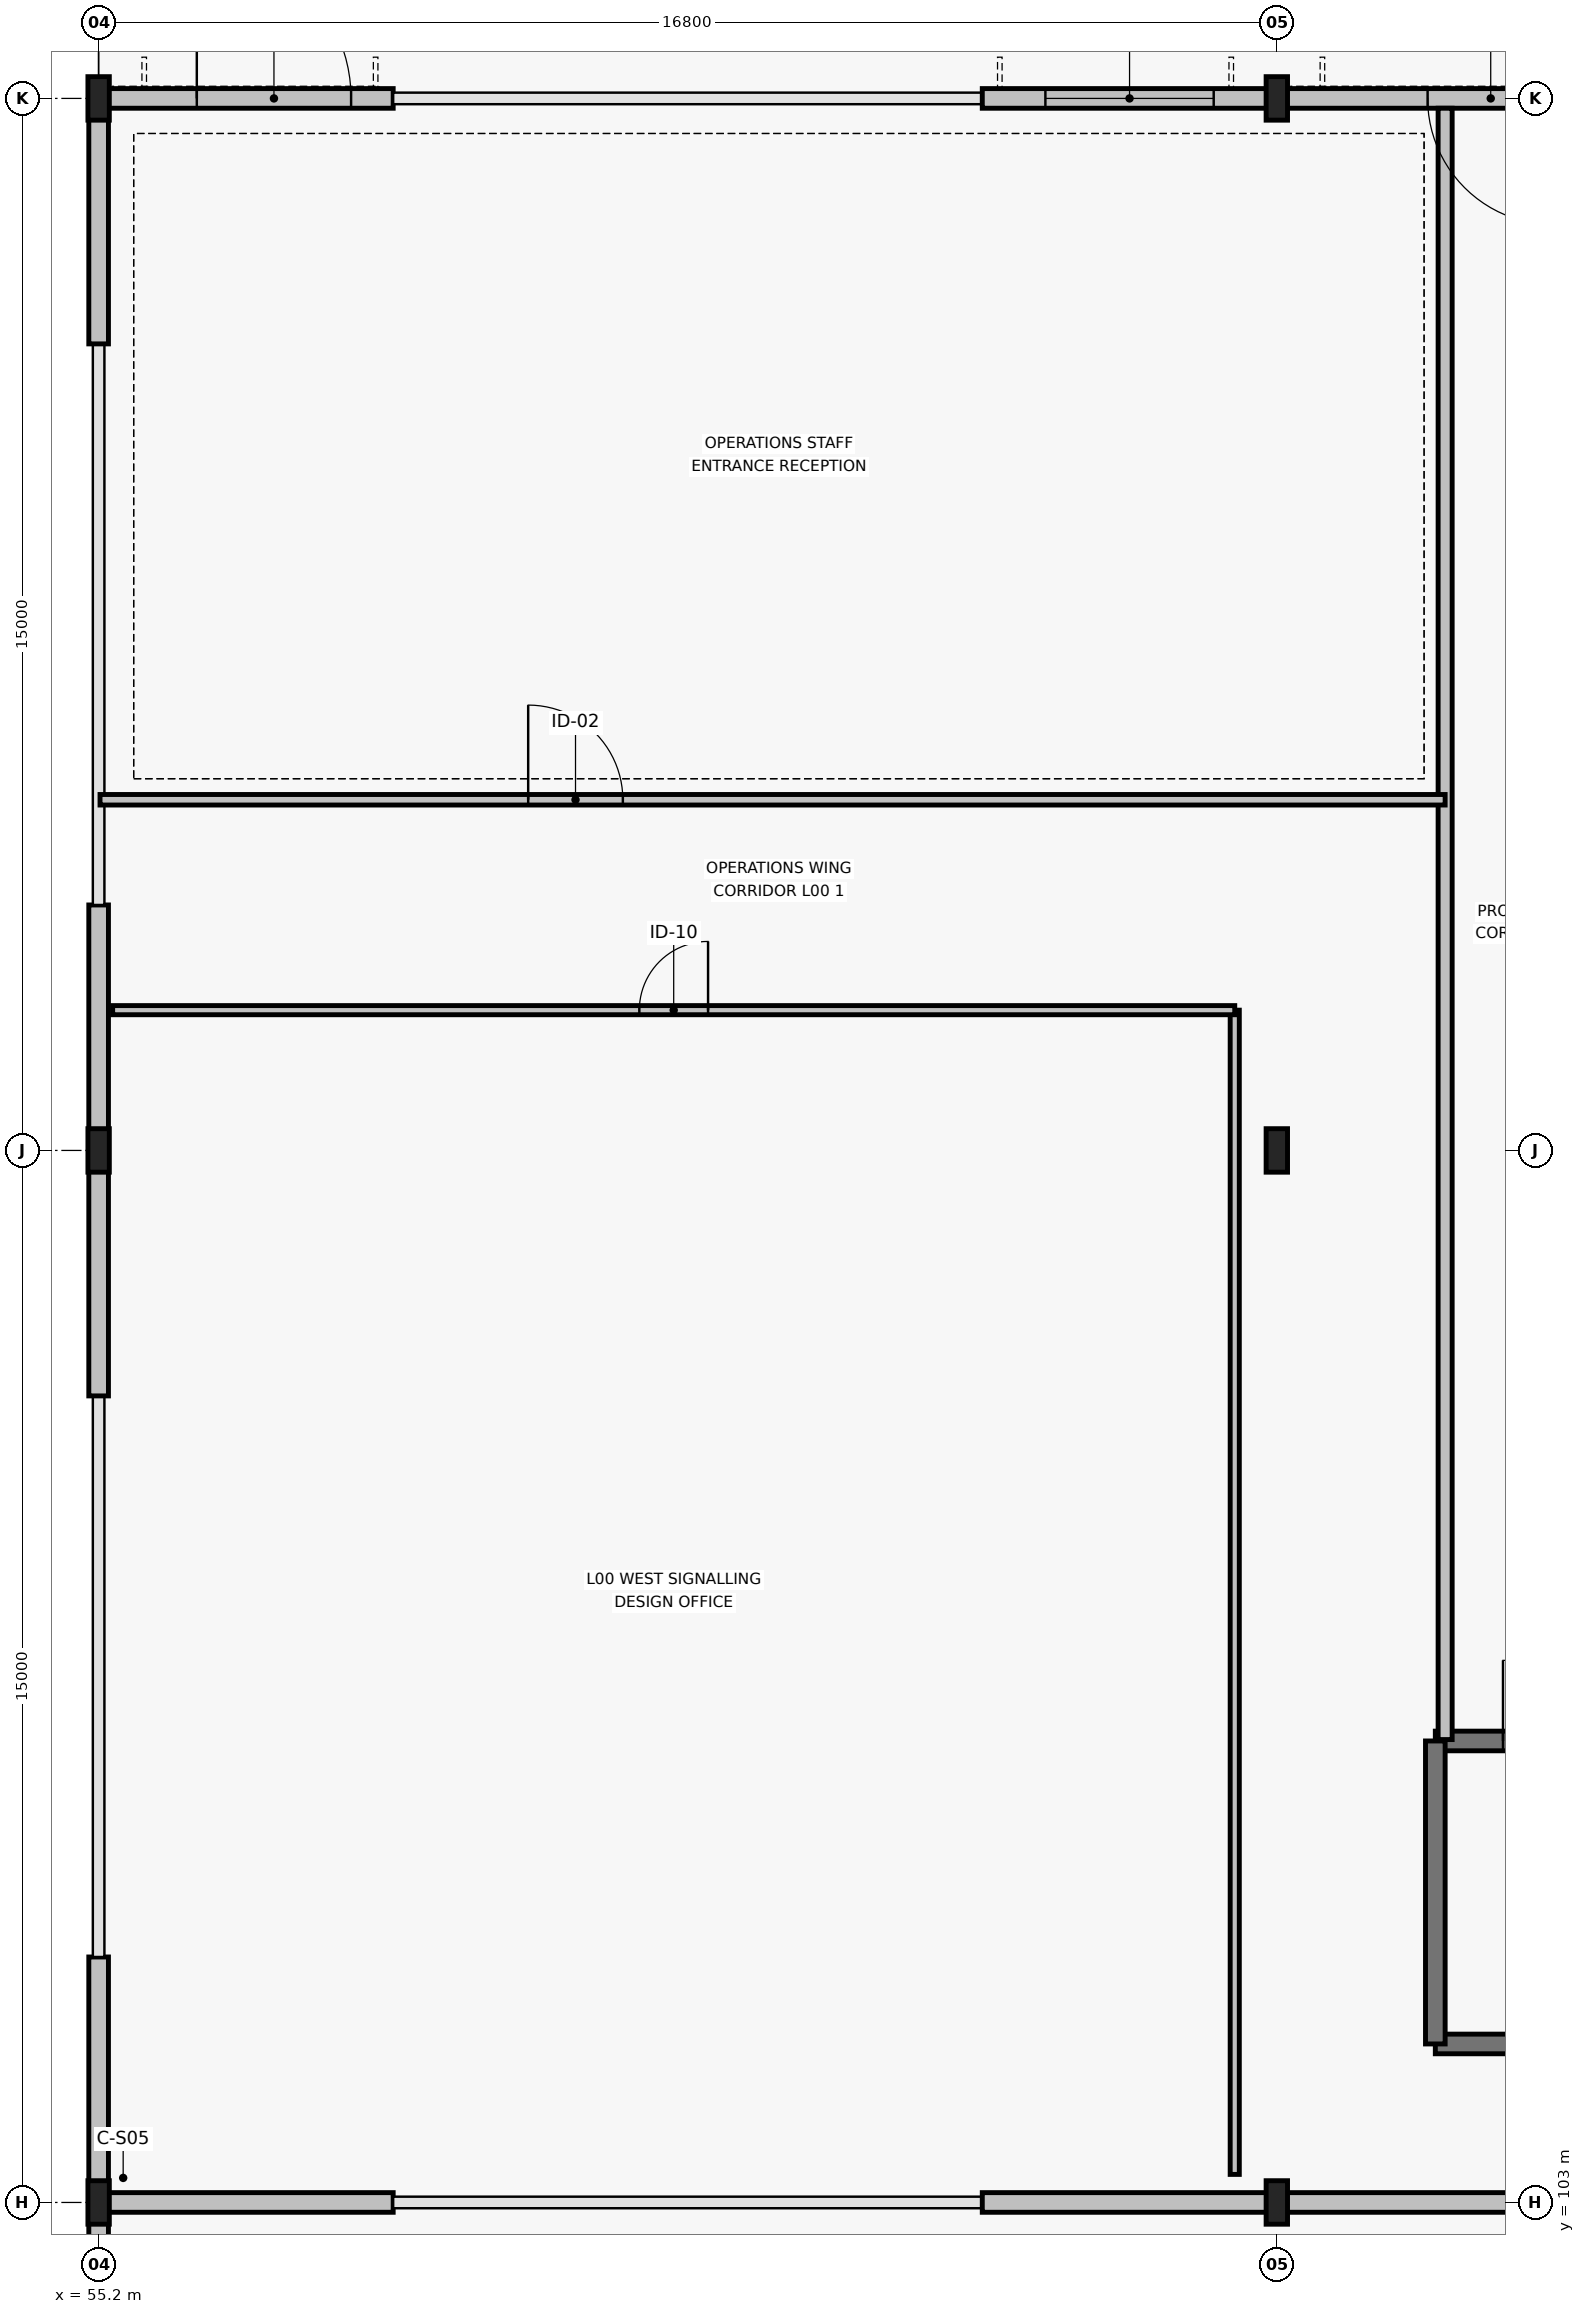
"""IFC4 building model, lengths in metres.
Left out: names, types, materials, properties, quantities, classifications, styles, units other than length and angle.
Written with IfcOpenShell. Run it as: python <this file> out.ifc"""

import sys

from ifc_helpers import new_model, si_unit, direction, frame, frame_2d, origin, origin_2d, place, context, subcontext, project, spatial, rectangle, i_section, extrude, element, fill, save


model = new_model("IFC4")
c1 = context("Model", 3, precision=1e-05, world=origin(), true_north=direction((0.0, 1.0)))
c2 = subcontext(c1, "Body", "Model", "MODEL_VIEW")
j1 = project(units=[si_unit("LENGTHUNIT", "METRE"), si_unit("PLANEANGLEUNIT", "RADIAN")], contexts=[c1])
p1 = place(None, origin())
s1 = spatial("IfcSite", under=j1, at=p1, CompositionType="ELEMENT")
p2 = place(p1, origin())
s2 = spatial("IfcBuilding", under=s1, at=p2, CompositionType="ELEMENT")
p3 = place(p2, origin())
s3 = spatial("IfcBuildingStorey", under=s2, at=p3, CompositionType="ELEMENT", Elevation=0.0)
for number, where, z_axis, x_axis in (
    (1, (55.2, 103.0, 0.0), (0.0, 0.0, 1.0), (1.0, 0.0, 0.0)),
    (2, (55.2, 118.0, 0.0), (0.0, 0.0, 1.0), (1.0, 0.0, 0.0)),
    (3, (55.2, 133.0, 0.0), (0.0, 0.0, 1.0), (1.0, 0.0, 0.0)),
    (4, (72.0, 103.0, 0.0), (0.0, 0.0, 1.0), (1.0, 0.0, 0.0)),
    (5, (72.0, 118.0, 0.0), (0.0, 0.0, 1.0), (1.0, 0.0, 0.0)),
    (6, (72.0, 133.0, 0.0), (0.0, 0.0, 1.0), (1.0, 0.0, 0.0)),
):
    element("IfcColumn", number, at=place(p3, frame(where, z_axis=z_axis, x_axis=x_axis)), inside=s3, PredefinedType="COLUMN", context=c2, shape_type="SweptSolid", body=[
        extrude(i_section(OverallWidth=0.305, OverallDepth=0.62, WebThickness=0.021, FlangeThickness=0.04, FilletRadius=0.027, at=origin_2d()), origin(), (0.0, 0.0, 1.0), 5.4),
    ])
p4 = place(p3, frame((55.2, 133.0, 0.0), z_axis=(0.0, 0.0, 1.0), x_axis=(1.0, 0.0, 0.0)))
e7 = element("IfcWall", 7, at=p4, inside=s3, PredefinedType="STANDARD", context=c2, shape_type="SweptSolid", body=[
    extrude(rectangle(XDim=4.2, YDim=0.28, at=frame_2d((2.1, 0.0))), origin(), (0.0, 0.0, 1.0), 4.765),
])
p5 = place(p4, frame((1.4, 0.0, 0.0)))
e8 = element("IfcOpeningElement", 8, at=p5, cuts=e7, PredefinedType="OPENING", context=c2, shape_type="SweptSolid", body=[
    extrude(rectangle(XDim=2.2, YDim=2.4, at=frame_2d((1.1, 1.2))), frame((0.0, 0.15, 0.0), z_axis=(0.0, -1.0, 0.0), x_axis=(1.0, 0.0, 0.0)), (0.0, 0.0, 1.0), 0.3),
])
p6 = place(p3, frame((67.8, 133.0, 0.0), z_axis=(0.0, 0.0, 1.0), x_axis=(1.0, 0.0, 0.0)))
e9 = element("IfcWall", 9, at=p6, inside=s3, PredefinedType="STANDARD", context=c2, shape_type="SweptSolid", body=[
    extrude(rectangle(XDim=4.2, YDim=0.28, at=frame_2d((2.1, 0.0))), origin(), (0.0, 0.0, 1.0), 4.765),
])
p7 = place(p6, frame((0.9, 0.0, 0.8)))
e10 = element("IfcOpeningElement", 10, at=p7, cuts=e9, PredefinedType="OPENING", context=c2, shape_type="SweptSolid", body=[
    extrude(rectangle(XDim=2.4, YDim=2.05, at=frame_2d((1.2, 1.025))), frame((0.0, 0.15, 0.0), z_axis=(0.0, -1.0, 0.0), x_axis=(1.0, 0.0, 0.0)), (0.0, 0.0, 1.0), 0.3),
])
p8 = place(p3, frame((72.0, 133.0, 0.0), z_axis=(0.0, 0.0, 1.0), x_axis=(1.0, 0.0, 0.0)))
e11 = element("IfcWall", 11, at=p8, inside=s3, PredefinedType="STANDARD", context=c2, shape_type="SweptSolid", body=[
    extrude(rectangle(XDim=4.2, YDim=0.28, at=frame_2d((2.1, 0.0))), origin(), (0.0, 0.0, 1.0), 4.765),
])
p9 = place(p8, frame((2.15, 0.0, 0.0)))
e12 = element("IfcOpeningElement", 12, at=p9, cuts=e11, PredefinedType="OPENING", context=c2, shape_type="SweptSolid", body=[
    extrude(rectangle(XDim=1.8, YDim=2.3, at=frame_2d((0.9, 1.15))), frame((0.0, 0.15, 0.0), z_axis=(0.0, -1.0, 0.0), x_axis=(1.0, 0.0, 0.0)), (0.0, 0.0, 1.0), 0.3),
])
for number, where, z_axis, x_axis in (
    (13, (55.2, 103.0, 0.0), (0.0, 0.0, 1.0), (1.0, 0.0, 0.0)),
    (14, (67.8, 103.0, 0.0), (0.0, 0.0, 1.0), (1.0, 0.0, 0.0)),
    (15, (72.0, 103.0, 0.0), (0.0, 0.0, 1.0), (1.0, 0.0, 0.0)),
):
    element("IfcWall", number, at=place(p3, frame(where, z_axis=z_axis, x_axis=x_axis)), inside=s3, PredefinedType="STANDARD", context=c2, shape_type="SweptSolid", body=[
        extrude(rectangle(XDim=4.2, YDim=0.28, at=frame_2d((2.1, 0.0))), origin(), (0.0, 0.0, 1.0), 4.765),
    ])
p10 = place(p3, frame((55.2, 103.14, 0.0), z_axis=(0.0, 0.0, 1.0), x_axis=(0.0, 1.0, 0.0)))
e16 = element("IfcWall", 16, at=p10, inside=s3, PredefinedType="STANDARD", context=c2, shape_type="SweptSolid", body=[
    extrude(rectangle(XDim=3.36, YDim=0.28, at=frame_2d((1.68, 0.0))), origin(), (0.0, 0.0, 1.0), 4.765),
])
for number, where, z_axis, x_axis in (
    (17, (55.2, 114.5, 0.0), (0.0, 0.0, 1.0), (0.0, 1.0, 0.0)),
    (18, (55.2, 118.0, 0.0), (0.0, 0.0, 1.0), (0.0, 1.0, 0.0)),
):
    element("IfcWall", number, at=place(p3, frame(where, z_axis=z_axis, x_axis=x_axis)), inside=s3, PredefinedType="STANDARD", context=c2, shape_type="SweptSolid", body=[
        extrude(rectangle(XDim=3.5, YDim=0.28, at=frame_2d((1.75, 0.0))), origin(), (0.0, 0.0, 1.0), 4.765),
    ])
p11 = place(p3, frame((55.2, 129.5, 0.0), z_axis=(0.0, 0.0, 1.0), x_axis=(0.0, 1.0, 0.0)))
e19 = element("IfcWall", 19, at=p11, inside=s3, PredefinedType="STANDARD", context=c2, shape_type="SweptSolid", body=[
    extrude(rectangle(XDim=3.36, YDim=0.28, at=frame_2d((1.68, 0.0))), origin(), (0.0, 0.0, 1.0), 4.765),
])
p12 = place(p3, frame((55.2, 96.8, 0.0), z_axis=(0.0, 0.0, 1.0), x_axis=(0.0, 1.0, 0.0)))
e20 = element("IfcWall", 20, at=p12, inside=s3, PredefinedType="STANDARD", context=c2, shape_type="SweptSolid", body=[
    extrude(rectangle(XDim=6.06, YDim=0.28, at=frame_2d((3.03, 0.0))), origin(), (0.0, 0.0, 1.0), 4.625),
])
p13 = place(p12, frame((1.6, 0.0, 0.0)))
e21 = element("IfcOpeningElement", 21, at=p13, cuts=e20, PredefinedType="OPENING", context=c2, shape_type="SweptSolid", body=[
    extrude(rectangle(XDim=2.4, YDim=2.4, at=frame_2d((1.2, 1.2))), frame((0.0, 0.15, 0.0), z_axis=(0.0, -1.0, 0.0), x_axis=(1.0, 0.0, 0.0)), (0.0, 0.0, 1.0), 0.3),
])
p14 = place(p3, frame((74.26, 105.26, 0.0), z_axis=(0.0, 0.0, 1.0), x_axis=(1.0, 0.0, 0.0)))
e22 = element("IfcWall", 22, at=p14, inside=s3, PredefinedType="SHEAR", context=c2, shape_type="SweptSolid", body=[
    extrude(rectangle(XDim=11.48, YDim=0.28, at=frame_2d((5.74, 0.0))), origin(), (0.0, 0.0, 1.0), 5.16),
])
p15 = place(p3, frame((85.74, 109.58, 0.0), z_axis=(0.0, 0.0, 1.0), x_axis=(-1.0, 0.0, 0.0)))
e23 = element("IfcWall", 23, at=p15, inside=s3, PredefinedType="SHEAR", context=c2, shape_type="SweptSolid", body=[
    extrude(rectangle(XDim=11.48, YDim=0.28, at=frame_2d((5.74, 0.0))), origin(), (0.0, 0.0, 1.0), 5.16),
])
p16 = place(p15, frame((9.365, 0.0, 0.0)))
e24 = element("IfcOpeningElement", 24, at=p16, cuts=e23, PredefinedType="OPENING", context=c2, shape_type="SweptSolid", body=[
    extrude(rectangle(XDim=1.15, YDim=2.2, at=frame_2d((0.575, 1.1))), frame((0.0, 0.15, 0.0), z_axis=(0.0, -1.0, 0.0), x_axis=(1.0, 0.0, 0.0)), (0.0, 0.0, 1.0), 0.3),
])
p17 = place(p3, frame((74.26, 109.58, 0.0), z_axis=(0.0, 0.0, 1.0), x_axis=(0.0, -1.0, 0.0)))
e25 = element("IfcWall", 25, at=p17, inside=s3, PredefinedType="SHEAR", context=c2, shape_type="SweptSolid", body=[
    extrude(rectangle(XDim=4.32, YDim=0.28, at=frame_2d((2.16, 0.0))), origin(), (0.0, 0.0, 1.0), 5.16),
])
p18 = place(p3, frame((74.4, 132.86, 0.0), z_axis=(0.0, 0.0, 1.0), x_axis=(0.0, -1.0, 0.0)))
e26 = element("IfcWall", 26, at=p18, inside=s3, PredefinedType="PARTITIONING", context=c2, shape_type="SweptSolid", body=[
    extrude(rectangle(XDim=23.26, YDim=0.2, at=frame_2d((11.63, 0.0))), origin(), (0.0, 0.0, 1.0), 5.16),
])
p19 = place(p3, frame((55.22, 123.0, 0.0), z_axis=(0.0, 0.0, 1.0), x_axis=(1.0, 0.0, 0.0)))
e27 = element("IfcWall", 27, at=p19, inside=s3, PredefinedType="PARTITIONING", context=c2, shape_type="SweptSolid", body=[
    extrude(rectangle(XDim=19.18, YDim=0.15, at=frame_2d((9.59, 0.0))), origin(), (0.0, 0.0, 1.0), 5.16),
])
p20 = place(p19, frame((6.105, 0.0, 0.0)))
e28 = element("IfcOpeningElement", 28, at=p20, cuts=e27, PredefinedType="OPENING", context=c2, shape_type="SweptSolid", body=[
    extrude(rectangle(XDim=1.35, YDim=2.2, at=frame_2d((0.675, 1.1))), frame((0.0, 0.085, 0.0), z_axis=(0.0, -1.0, 0.0), x_axis=(1.0, 0.0, 0.0)), (0.0, 0.0, 1.0), 0.17),
])
p21 = place(p3, frame((71.4, 103.4, 0.0), z_axis=(0.0, 0.0, 1.0), x_axis=(0.0, 1.0, 0.0)))
e29 = element("IfcWall", 29, at=p21, inside=s3, PredefinedType="PARTITIONING", context=c2, shape_type="SweptSolid", body=[
    extrude(rectangle(XDim=16.6, YDim=0.13, at=frame_2d((8.3, 0.0))), origin(), (0.0, 0.0, 1.0), 4.655),
])
p22 = place(p3, frame((71.4, 120.0, 0.0), z_axis=(0.0, 0.0, 1.0), x_axis=(-1.0, 0.0, 0.0)))
e30 = element("IfcWall", 30, at=p22, inside=s3, PredefinedType="PARTITIONING", context=c2, shape_type="SweptSolid", body=[
    extrude(rectangle(XDim=16.0, YDim=0.13, at=frame_2d((8.0, 0.0))), origin(), (0.0, 0.0, 1.0), 5.16),
])
p23 = place(p22, frame((8.49, 0.0, 0.0), z_axis=(0.0, 0.0, 1.0), x_axis=(-1.0, 0.0, 0.0)))
e31 = element("IfcOpeningElement", 31, at=p23, cuts=e30, PredefinedType="OPENING", context=c2, shape_type="SweptSolid", body=[
    extrude(rectangle(XDim=0.98, YDim=2.1, at=frame_2d((0.49, 1.05))), frame((0.0, 0.075, 0.0), z_axis=(0.0, -1.0, 0.0), x_axis=(1.0, 0.0, 0.0)), (0.0, 0.0, 1.0), 0.15),
])
p24 = place(p5, origin())
e32 = element("IfcDoor", 32, at=p24, inside=s3, OperationType="SINGLE_SWING_LEFT", PredefinedType="DOOR", context=c2, shape_type="SweptSolid", body=[
    extrude(rectangle(XDim=2.2, YDim=2.4, at=frame_2d((1.1, 1.2))), frame((0.0, 0.025, 0.0), z_axis=(0.0, -1.0, 0.0), x_axis=(1.0, 0.0, 0.0)), (0.0, 0.0, 1.0), 0.05),
])
fill(e8, e32)
p25 = place(p7, origin())
e33 = element("IfcWindow", 33, at=p25, inside=s3, PartitioningType="SINGLE_PANEL", PredefinedType="WINDOW", context=c2, shape_type="SweptSolid", body=[
    extrude(rectangle(XDim=2.4, YDim=2.05, at=frame_2d((1.2, 1.025))), frame((0.0, 0.03, 0.0), z_axis=(0.0, -1.0, 0.0), x_axis=(1.0, 0.0, 0.0)), (0.0, 0.0, 1.0), 0.06),
])
fill(e10, e33)
p26 = place(p9, origin())
e34 = element("IfcDoor", 34, at=p26, inside=s3, OperationType="SINGLE_SWING_RIGHT", PredefinedType="DOOR", context=c2, shape_type="SweptSolid", body=[
    extrude(rectangle(XDim=1.8, YDim=2.3, at=frame_2d((0.9, 1.15))), frame((0.0, 0.025, 0.0), z_axis=(0.0, -1.0, 0.0), x_axis=(1.0, 0.0, 0.0)), (0.0, 0.0, 1.0), 0.05),
])
fill(e12, e34)
p27 = place(p16, origin())
e35 = element("IfcDoor", 35, at=p27, inside=s3, OperationType="SINGLE_SWING_RIGHT", PredefinedType="DOOR", context=c2, shape_type="SweptSolid", body=[
    extrude(rectangle(XDim=1.15, YDim=2.2, at=frame_2d((0.575, 1.1))), frame((0.0, 0.025, 0.0), z_axis=(0.0, -1.0, 0.0), x_axis=(1.0, 0.0, 0.0)), (0.0, 0.0, 1.0), 0.05),
])
fill(e24, e35)
p28 = place(p20, origin())
e36 = element("IfcDoor", 36, at=p28, inside=s3, OperationType="SINGLE_SWING_LEFT", PredefinedType="DOOR", context=c2, shape_type="SweptSolid", body=[
    extrude(rectangle(XDim=1.35, YDim=2.2, at=frame_2d((0.675, 1.1))), frame((0.0, 0.025, 0.0), z_axis=(0.0, -1.0, 0.0), x_axis=(1.0, 0.0, 0.0)), (0.0, 0.0, 1.0), 0.05),
])
fill(e28, e36)
p29 = place(p23, origin())
e37 = element("IfcDoor", 37, at=p29, inside=s3, OperationType="SINGLE_SWING_LEFT", PredefinedType="DOOR", context=c2, shape_type="SweptSolid", body=[
    extrude(rectangle(XDim=0.98, YDim=2.1, at=frame_2d((0.49, 1.05))), frame((0.0, 0.025, 0.0), z_axis=(0.0, -1.0, 0.0), x_axis=(1.0, 0.0, 0.0)), (0.0, 0.0, 1.0), 0.05),
])
fill(e31, e37)
save(model, sys.argv[1])
